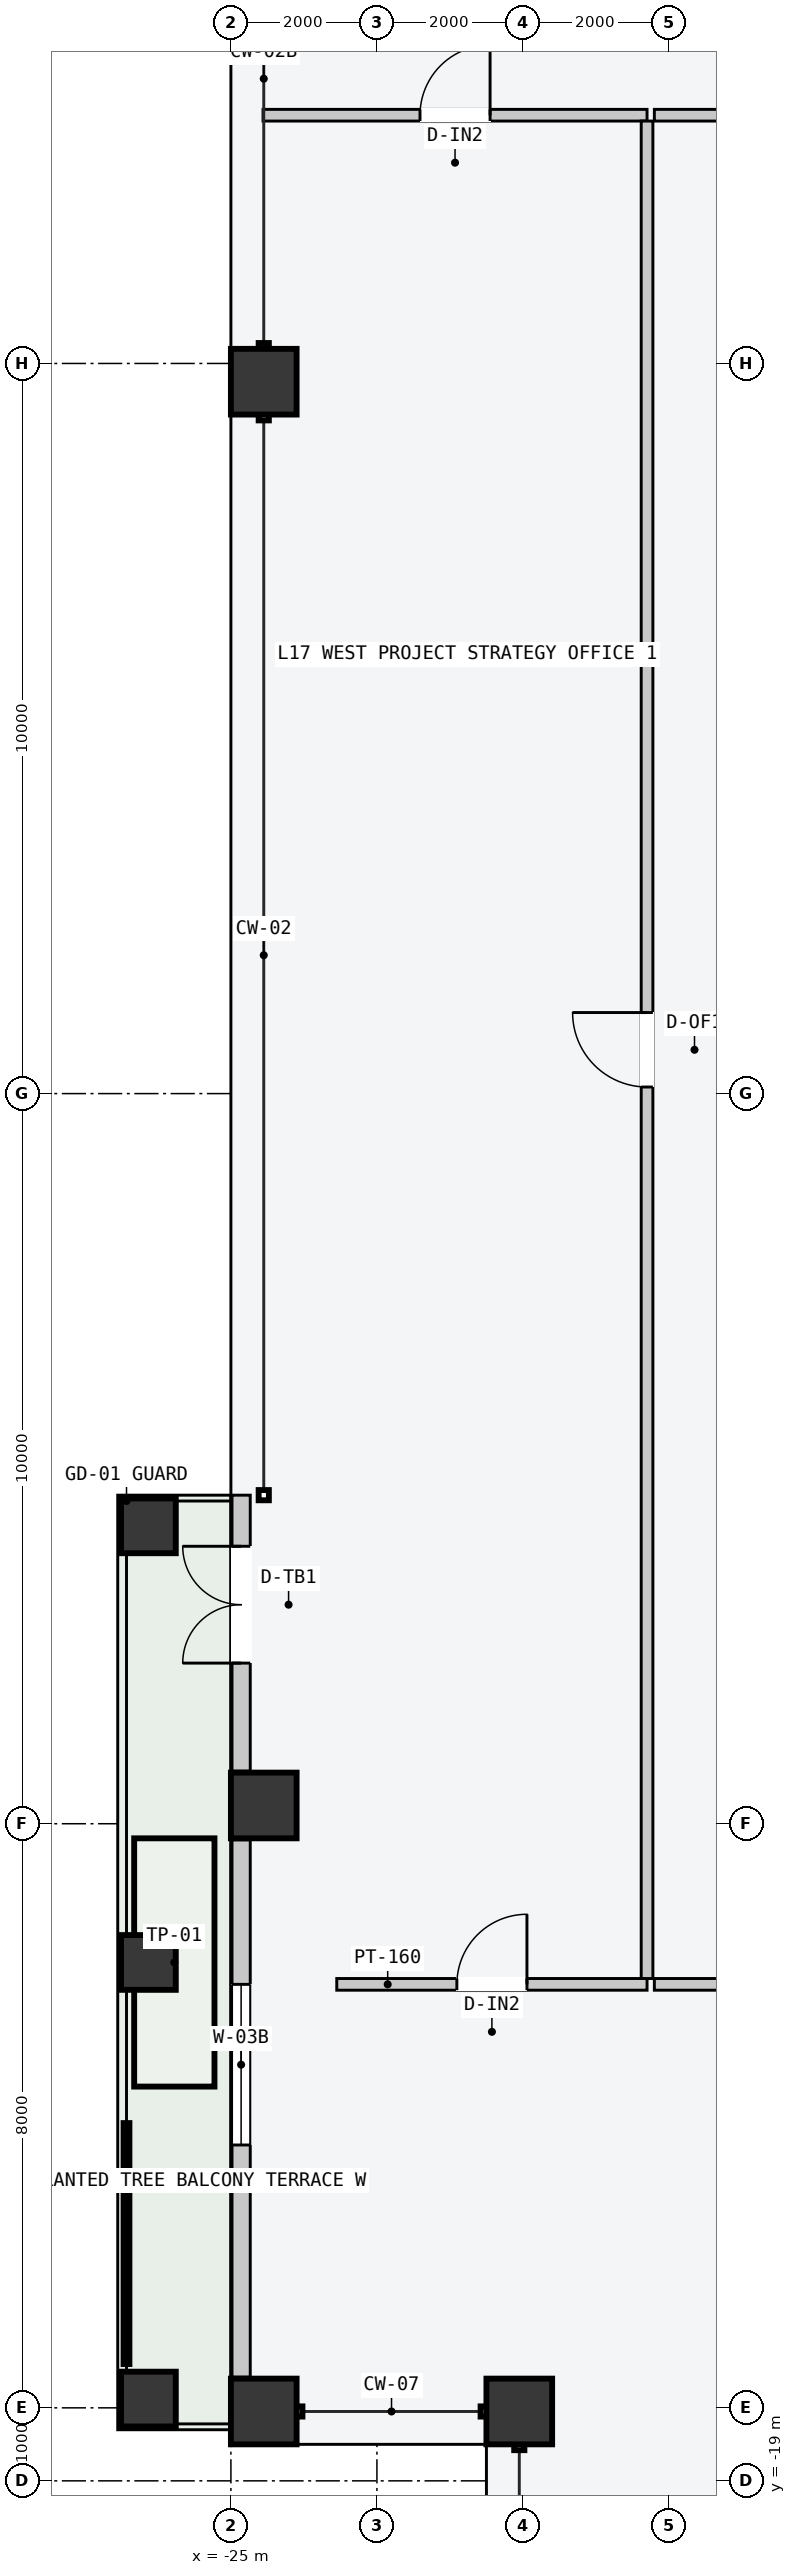
"""IFC4 building model, lengths in metres.
Left out: names, types, materials, properties, quantities, classifications, styles, units other than length and angle.
Written with IfcOpenShell. Run it as: python <this file> out.ifc"""

import sys

from ifc_helpers import new_model, si_unit, direction, frame, frame_2d, origin, origin_2d, place, context, subcontext, project, spatial, rectangle, hollow_rectangle, extrude, element, fill, save


model = new_model("IFC4")
c1 = context("Model", 3, precision=1e-05, world=origin(), true_north=direction((0.0, 1.0)))
c2 = subcontext(c1, "Body", "Model", "MODEL_VIEW")
j1 = project(units=[si_unit("LENGTHUNIT", "METRE"), si_unit("PLANEANGLEUNIT", "RADIAN")], contexts=[c1])
p1 = place(None, origin())
s1 = spatial("IfcSite", under=j1, at=p1, CompositionType="ELEMENT")
p2 = place(p1, origin())
s2 = spatial("IfcBuilding", under=s1, at=p2, CompositionType="ELEMENT")
p3 = place(p2, frame((0.0, 0.0, 67.2)))
s3 = spatial("IfcBuildingStorey", under=s2, at=p3, CompositionType="ELEMENT", Elevation=67.2)
for number, where, z_axis, x_axis in (
    (1, (-24.55, -18.05, 0.0), (0.0, 0.0, 1.0), (0.0, 1.0, 0.0)),
    (2, (-24.55, -9.75, 0.0), (0.0, 0.0, 1.0), (0.0, 1.0, 0.0)),
    (3, (-24.55, 9.75, 0.0), (0.0, 0.0, 1.0), (0.0, 1.0, 0.0)),
    (4, (-21.05, -18.05, 0.0), (0.0, 0.0, 1.0), (1.0, 0.0, 0.0)),
):
    element("IfcColumn", number, at=place(p3, frame(where, z_axis=z_axis, x_axis=x_axis)), inside=s3, PredefinedType="COLUMN", context=c2, shape_type="SweptSolid", body=[
        extrude(hollow_rectangle(XDim=0.9, YDim=0.9, WallThickness=0.045, at=origin_2d()), origin(), (0.0, 0.0, 1.0), 3.6),
    ])
for number, where, z_axis, x_axis in (
    (5, (-26.13, -17.88, 0.0), (0.0, 0.0, 1.0), (0.0, 1.0, 0.0)),
    (6, (-26.13, -5.92, 0.0), (0.0, 0.0, 1.0), (0.0, 1.0, 0.0)),
    (7, (-26.13, -11.9, 0.0), (0.0, 0.0, 1.0), (0.0, 1.0, 0.0)),
):
    element("IfcColumn", number, at=place(p3, frame(where, z_axis=z_axis, x_axis=x_axis)), inside=s3, PredefinedType="COLUMN", context=c2, shape_type="SweptSolid", body=[
        extrude(hollow_rectangle(XDim=0.75, YDim=0.75, WallThickness=0.032, at=origin_2d()), origin(), (0.0, 0.0, 1.0), 3.6),
    ])
p4 = place(p3, frame((-24.86, -17.58, 0.0), z_axis=(0.0, 0.0, 1.0), x_axis=(0.0, 1.0, 0.0)))
e8 = element("IfcWall", 8, at=p4, inside=s3, PredefinedType="STANDARD", context=c2, shape_type="SweptSolid", body=[
    extrude(rectangle(XDim=7.36, YDim=0.25, at=frame_2d((3.68, 0.0))), origin(), (0.0, 0.0, 1.0), 3.4),
])
p5 = place(p4, frame((3.18, 0.0, 0.85)))
e9 = element("IfcOpeningElement", 9, at=p5, cuts=e8, PredefinedType="OPENING", context=c2, shape_type="SweptSolid", body=[
    extrude(rectangle(XDim=2.2, YDim=2.1, at=frame_2d((1.1, 1.05))), frame((0.0, 0.135, 0.0), z_axis=(0.0, -1.0, 0.0), x_axis=(1.0, 0.0, 0.0)), (0.0, 0.0, 1.0), 0.27),
])
p6 = place(p3, frame((-24.86, -9.28, 0.0), z_axis=(0.0, 0.0, 1.0), x_axis=(0.0, 1.0, 0.0)))
e10 = element("IfcWall", 10, at=p6, inside=s3, PredefinedType="STANDARD", context=c2, shape_type="SweptSolid", body=[
    extrude(rectangle(XDim=3.78, YDim=0.25, at=frame_2d((1.89, 0.0))), origin(), (0.0, 0.0, 1.0), 3.4),
])
p7 = place(p6, frame((1.48, 0.0, 0.0)))
e11 = element("IfcOpeningElement", 11, at=p7, cuts=e10, PredefinedType="OPENING", context=c2, shape_type="SweptSolid", body=[
    extrude(rectangle(XDim=1.6, YDim=2.2, at=frame_2d((0.8, 1.1))), frame((0.0, 0.135, 0.0), z_axis=(0.0, -1.0, 0.0), x_axis=(1.0, 0.0, 0.0)), (0.0, 0.0, 1.0), 0.27),
])
p8 = place(p3, frame((-19.2, 13.4, 0.0), z_axis=(0.0, 0.0, 1.0), x_axis=(1.0, 0.0, 0.0)))
e12 = element("IfcWall", 12, at=p8, inside=s3, PredefinedType="PARTITIONING", context=c2, shape_type="SweptSolid", body=[
    extrude(rectangle(XDim=38.4, YDim=0.16, at=frame_2d((19.2, 0.0))), origin(), (0.0, 0.0, 1.0), 3.4),
])
p9 = place(p8, frame((4.143, 0.0, 0.0)))
e13 = element("IfcOpeningElement", 13, at=p9, cuts=e12, PredefinedType="OPENING", context=c2, shape_type="SweptSolid", body=[
    extrude(rectangle(XDim=0.96, YDim=2.18, at=frame_2d((0.48, 1.09))), frame((0.0, 0.09, 0.0), z_axis=(0.0, -1.0, 0.0), x_axis=(1.0, 0.0, 0.0)), (0.0, 0.0, 1.0), 0.18),
])
p10 = place(p8, frame((13.115, 0.0, 0.0)))
e14 = element("IfcOpeningElement", 14, at=p10, cuts=e12, PredefinedType="OPENING", context=c2, shape_type="SweptSolid", body=[
    extrude(rectangle(XDim=1.02, YDim=2.2, at=frame_2d((0.51, 1.1))), frame((0.0, 0.09, 0.0), z_axis=(0.0, -1.0, 0.0), x_axis=(1.0, 0.0, 0.0)), (0.0, 0.0, 1.0), 0.18),
])
p11 = place(p8, frame((21.258, 0.0, 0.0)))
e15 = element("IfcOpeningElement", 15, at=p11, cuts=e12, PredefinedType="OPENING", context=c2, shape_type="SweptSolid", body=[
    extrude(rectangle(XDim=1.06, YDim=2.2, at=frame_2d((0.53, 1.1))), frame((0.0, 0.09, 0.0), z_axis=(0.0, -1.0, 0.0), x_axis=(1.0, 0.0, 0.0)), (0.0, 0.0, 1.0), 0.18),
])
p12 = place(p8, frame((28.535, 0.0, 0.0)))
e16 = element("IfcOpeningElement", 16, at=p12, cuts=e12, PredefinedType="OPENING", context=c2, shape_type="SweptSolid", body=[
    extrude(rectangle(XDim=1.24, YDim=2.24, at=frame_2d((0.62, 1.12))), frame((0.0, 0.09, 0.0), z_axis=(0.0, -1.0, 0.0), x_axis=(1.0, 0.0, 0.0)), (0.0, 0.0, 1.0), 0.18),
])
p13 = place(p8, frame((34.869, 0.0, 0.0)))
e17 = element("IfcOpeningElement", 17, at=p13, cuts=e12, PredefinedType="OPENING", context=c2, shape_type="SweptSolid", body=[
    extrude(rectangle(XDim=1.4, YDim=2.2, at=frame_2d((0.7, 1.1))), frame((0.0, 0.09, 0.0), z_axis=(0.0, -1.0, 0.0), x_axis=(1.0, 0.0, 0.0)), (0.0, 0.0, 1.0), 0.18),
])
p14 = place(p3, frame((-24.56, 13.4, 0.0), z_axis=(0.0, 0.0, 1.0), x_axis=(1.0, 0.0, 0.0)))
e18 = element("IfcWall", 18, at=p14, inside=s3, PredefinedType="PARTITIONING", context=c2, shape_type="SweptSolid", body=[
    extrude(rectangle(XDim=5.26, YDim=0.16, at=frame_2d((2.63, 0.0))), origin(), (0.0, 0.0, 1.0), 3.4),
])
p15 = place(p14, frame((2.15, 0.0, 0.0)))
e19 = element("IfcOpeningElement", 19, at=p15, cuts=e18, PredefinedType="OPENING", context=c2, shape_type="SweptSolid", body=[
    extrude(rectangle(XDim=0.96, YDim=2.18, at=frame_2d((0.48, 1.09))), frame((0.0, 0.09, 0.0), z_axis=(0.0, -1.0, 0.0), x_axis=(1.0, 0.0, 0.0)), (0.0, 0.0, 1.0), 0.18),
])
p16 = place(p3, frame((-19.2, -12.2, 0.0), z_axis=(0.0, 0.0, 1.0), x_axis=(1.0, 0.0, 0.0)))
e20 = element("IfcWall", 20, at=p16, inside=s3, PredefinedType="PARTITIONING", context=c2, shape_type="SweptSolid", body=[
    extrude(rectangle(XDim=38.4, YDim=0.16, at=frame_2d((19.2, 0.0))), origin(), (0.0, 0.0, 1.0), 3.4),
])
p17 = place(p16, frame((7.387, 0.0, 0.0)))
e21 = element("IfcOpeningElement", 21, at=p17, cuts=e20, PredefinedType="OPENING", context=c2, shape_type="SweptSolid", body=[
    extrude(rectangle(XDim=1.24, YDim=2.24, at=frame_2d((0.62, 1.12))), frame((0.0, 0.09, 0.0), z_axis=(0.0, -1.0, 0.0), x_axis=(1.0, 0.0, 0.0)), (0.0, 0.0, 1.0), 0.18),
])
p18 = place(p16, frame((26.507, 0.0, 0.0)))
e22 = element("IfcOpeningElement", 22, at=p18, cuts=e20, PredefinedType="OPENING", context=c2, shape_type="SweptSolid", body=[
    extrude(rectangle(XDim=1.4, YDim=2.2, at=frame_2d((0.7, 1.1))), frame((0.0, 0.09, 0.0), z_axis=(0.0, -1.0, 0.0), x_axis=(1.0, 0.0, 0.0)), (0.0, 0.0, 1.0), 0.18),
])
p19 = place(p3, frame((-23.55, -12.2, 0.0), z_axis=(0.0, 0.0, 1.0), x_axis=(1.0, 0.0, 0.0)))
e23 = element("IfcWall", 23, at=p19, inside=s3, PredefinedType="PARTITIONING", context=c2, shape_type="SweptSolid", body=[
    extrude(rectangle(XDim=4.25, YDim=0.16, at=frame_2d((2.125, 0.0))), origin(), (0.0, 0.0, 1.0), 3.4),
])
p20 = place(p19, frame((1.645, 0.0, 0.0)))
e24 = element("IfcOpeningElement", 24, at=p20, cuts=e23, PredefinedType="OPENING", context=c2, shape_type="SweptSolid", body=[
    extrude(rectangle(XDim=0.96, YDim=2.18, at=frame_2d((0.48, 1.09))), frame((0.0, 0.09, 0.0), z_axis=(0.0, -1.0, 0.0), x_axis=(1.0, 0.0, 0.0)), (0.0, 0.0, 1.0), 0.18),
])
p21 = place(p3, frame((-19.3, -12.12, 0.0), z_axis=(0.0, 0.0, 1.0), x_axis=(0.0, 1.0, 0.0)))
e25 = element("IfcWall", 25, at=p21, inside=s3, PredefinedType="PARTITIONING", context=c2, shape_type="SweptSolid", body=[
    extrude(rectangle(XDim=25.44, YDim=0.16, at=frame_2d((12.72, 0.0))), origin(), (0.0, 0.0, 1.0), 3.4),
])
p22 = place(p21, frame((12.21, 0.0, 0.0)))
e26 = element("IfcOpeningElement", 26, at=p22, cuts=e25, PredefinedType="OPENING", context=c2, shape_type="SweptSolid", body=[
    extrude(rectangle(XDim=1.02, YDim=2.2, at=frame_2d((0.51, 1.1))), frame((0.0, 0.09, 0.0), z_axis=(0.0, -1.0, 0.0), x_axis=(1.0, 0.0, 0.0)), (0.0, 0.0, 1.0), 0.18),
])
p23 = place(p5, origin())
e27 = element("IfcWindow", 27, at=p23, inside=s3, PartitioningType="SINGLE_PANEL", PredefinedType="WINDOW", context=c2, shape_type="SweptSolid", body=[
    extrude(rectangle(XDim=2.2, YDim=2.1, at=frame_2d((1.1, 1.05))), frame((0.0, 0.03, 0.0), z_axis=(0.0, -1.0, 0.0), x_axis=(1.0, 0.0, 0.0)), (0.0, 0.0, 1.0), 0.06),
])
fill(e9, e27)
p24 = place(p7, origin())
e28 = element("IfcDoor", 28, at=p24, inside=s3, OperationType="DOUBLE_DOOR_SINGLE_SWING", PredefinedType="DOOR", context=c2, shape_type="SweptSolid", body=[
    extrude(rectangle(XDim=1.6, YDim=2.2, at=frame_2d((0.8, 1.1))), frame((0.0, 0.025, 0.0), z_axis=(0.0, -1.0, 0.0), x_axis=(1.0, 0.0, 0.0)), (0.0, 0.0, 1.0), 0.05),
])
fill(e11, e28)
p25 = place(p15, origin())
e29 = element("IfcDoor", 29, at=p25, inside=s3, OperationType="SINGLE_SWING_RIGHT", PredefinedType="DOOR", context=c2, shape_type="SweptSolid", body=[
    extrude(rectangle(XDim=0.96, YDim=2.18, at=frame_2d((0.48, 1.09))), frame((0.0, 0.025, 0.0), z_axis=(0.0, -1.0, 0.0), x_axis=(1.0, 0.0, 0.0)), (0.0, 0.0, 1.0), 0.05),
])
fill(e19, e29)
p26 = place(p20, origin())
e30 = element("IfcDoor", 30, at=p26, inside=s3, OperationType="SINGLE_SWING_RIGHT", PredefinedType="DOOR", context=c2, shape_type="SweptSolid", body=[
    extrude(rectangle(XDim=0.96, YDim=2.18, at=frame_2d((0.48, 1.09))), frame((0.0, 0.025, 0.0), z_axis=(0.0, -1.0, 0.0), x_axis=(1.0, 0.0, 0.0)), (0.0, 0.0, 1.0), 0.05),
])
fill(e24, e30)
p27 = place(p22, origin())
e31 = element("IfcDoor", 31, at=p27, inside=s3, OperationType="SINGLE_SWING_RIGHT", PredefinedType="DOOR", context=c2, shape_type="SweptSolid", body=[
    extrude(rectangle(XDim=1.02, YDim=2.2, at=frame_2d((0.51, 1.1))), frame((0.0, 0.025, 0.0), z_axis=(0.0, -1.0, 0.0), x_axis=(1.0, 0.0, 0.0)), (0.0, 0.0, 1.0), 0.05),
])
fill(e26, e31)
save(model, sys.argv[1])
